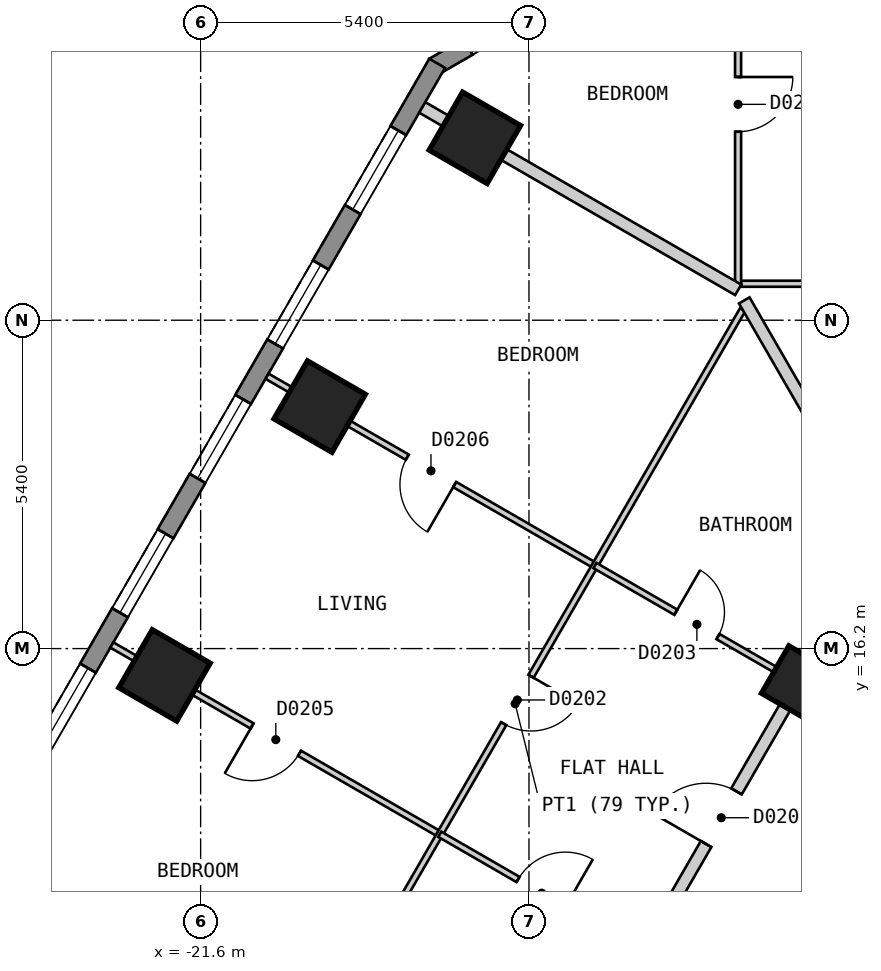
"""IFC4 building model, lengths in metres.
Left out: names, types, materials, properties, quantities, classifications, styles, units other than length and angle.
Written with IfcOpenShell. Run it as: python <this file> out.ifc"""

import sys

from ifc_helpers import new_model, si_unit, direction, frame, frame_2d, origin, origin_2d, place, context, subcontext, project, spatial, polyline, rectangle, outline, extrude, element, fill, save


model = new_model("IFC4")
c1 = context("Model", 3, precision=1e-05, world=origin(), true_north=direction((0.0, 1.0)))
c2 = subcontext(c1, "Body", "Model", "MODEL_VIEW")
j1 = project(units=[si_unit("LENGTHUNIT", "METRE"), si_unit("PLANEANGLEUNIT", "RADIAN")], contexts=[c1])
p1 = place(None, origin())
s1 = spatial("IfcSite", under=j1, at=p1, CompositionType="ELEMENT")
p2 = place(p1, origin())
s2 = spatial("IfcBuilding", under=s1, at=p2, CompositionType="ELEMENT")
p3 = place(p2, frame((0.0, 0.0, 47.4)))
s3 = spatial("IfcBuildingStorey", under=s2, at=p3, CompositionType="ELEMENT", Elevation=47.4)
for number, where, z_axis, x_axis in (
    (1, (-17.09, 24.6, 0.0), (0.0, 0.0, 1.0), (-0.5, -0.866, 0.0)),
    (2, (-19.642, 20.18, 0.0), (0.0, 0.0, 1.0), (-0.5, -0.866, 0.0)),
    (3, (-22.194, 15.759, 0.0), (0.0, 0.0, 1.0), (-0.5, -0.866, 0.0)),
):
    element("IfcColumn", number, at=place(p3, frame(where, z_axis=z_axis, x_axis=x_axis)), inside=s3, PredefinedType="COLUMN", context=c2, shape_type="SweptSolid", body=[
        extrude(rectangle(XDim=1.1, YDim=1.1, at=origin_2d()), origin(), (0.0, 0.0, 1.0), 3.0),
    ])
p4 = place(p3, frame((-11.761, 15.63, 0.0), z_axis=(0.0, 0.0, 1.0), x_axis=(-0.499984884929, -0.866034130299, 0.0)))
e4 = element("IfcColumn", 4, at=p4, inside=s3, PredefinedType="COLUMN", context=c2, shape_type="SweptSolid", body=[
    extrude(rectangle(XDim=0.9, YDim=0.9, at=origin_2d()), origin(), (0.0, 0.0, 1.0), 3.0),
])
p5 = place(p3, frame((-13.435, 28.27, 0.0), z_axis=(0.0, 0.0, 1.0), x_axis=(-0.866010750942, -0.50002537861, 0.0)))
e5 = element("IfcWall", 5, at=p5, inside=s3, PredefinedType="SOLIDWALL", context=c2, shape_type="SweptSolid", body=[
    extrude(outline(polyline([(0.0, -0.15), (5.0, -0.15), (4.919, 0.15), (0.08, 0.15), (0.0, -0.15)])), origin(), (0.0, 0.0, 1.0), 2.7),
])
p6 = place(p5, frame((0.65, 0.0, 0.15)))
e6 = element("IfcOpeningElement", 6, at=p6, cuts=e5, PredefinedType="OPENING", context=c2, shape_type="SweptSolid", body=[
    extrude(rectangle(XDim=1.2, YDim=2.1, at=frame_2d((0.6, 1.05))), frame((0.0, 0.16, 0.0), z_axis=(0.0, -1.0, 0.0), x_axis=(1.0, 0.0, 0.0)), (0.0, 0.0, 1.0), 0.32),
])
p7 = place(p5, frame((3.149, 0.0, 0.15)))
e7 = element("IfcOpeningElement", 7, at=p7, cuts=e5, PredefinedType="OPENING", context=c2, shape_type="SweptSolid", body=[
    extrude(rectangle(XDim=1.2, YDim=2.1, at=frame_2d((0.6, 1.05))), frame((0.0, 0.16, 0.0), z_axis=(0.0, -1.0, 0.0), x_axis=(1.0, 0.0, 0.0)), (0.0, 0.0, 1.0), 0.32),
])
p8 = place(p3, frame((-17.71, 25.825, 0.0), z_axis=(0.0, 0.0, 1.0), x_axis=(-0.500001938803, -0.866024284413, 0.0)))
e8 = element("IfcWall", 8, at=p8, inside=s3, PredefinedType="SOLIDWALL", context=c2, shape_type="SweptSolid", body=[
    extrude(outline(polyline([(0.0, -0.15), (27.02, -0.15), (26.94, 0.15), (0.08, 0.15), (0.0, -0.15)])), origin(), (0.0, 0.0, 1.0), 2.7),
])
p9 = place(p8, frame((1.277, 0.0, 0.15)))
e9 = element("IfcOpeningElement", 9, at=p9, cuts=e8, PredefinedType="OPENING", context=c2, shape_type="SweptSolid", body=[
    extrude(rectangle(XDim=1.5, YDim=2.1, at=frame_2d((0.75, 1.05))), frame((0.0, 0.16, 0.0), z_axis=(0.0, -1.0, 0.0), x_axis=(1.0, 0.0, 0.0)), (0.0, 0.0, 1.0), 0.32),
])
p10 = place(p8, frame((3.829, 0.0, 0.15)))
e10 = element("IfcOpeningElement", 10, at=p10, cuts=e8, PredefinedType="OPENING", context=c2, shape_type="SweptSolid", body=[
    extrude(rectangle(XDim=1.5, YDim=2.1, at=frame_2d((0.75, 1.05))), frame((0.0, 0.16, 0.0), z_axis=(0.0, -1.0, 0.0), x_axis=(1.0, 0.0, 0.0)), (0.0, 0.0, 1.0), 0.32),
])
p11 = place(p8, frame((6.382, 0.0, 0.15)))
e11 = element("IfcOpeningElement", 11, at=p11, cuts=e8, PredefinedType="OPENING", context=c2, shape_type="SweptSolid", body=[
    extrude(rectangle(XDim=1.5, YDim=2.1, at=frame_2d((0.75, 1.05))), frame((0.0, 0.16, 0.0), z_axis=(0.0, -1.0, 0.0), x_axis=(1.0, 0.0, 0.0)), (0.0, 0.0, 1.0), 0.32),
])
p12 = place(p8, frame((8.933, 0.0, 0.15)))
e12 = element("IfcOpeningElement", 12, at=p12, cuts=e8, PredefinedType="OPENING", context=c2, shape_type="SweptSolid", body=[
    extrude(rectangle(XDim=1.5, YDim=2.1, at=frame_2d((0.75, 1.05))), frame((0.0, 0.16, 0.0), z_axis=(0.0, -1.0, 0.0), x_axis=(1.0, 0.0, 0.0)), (0.0, 0.0, 1.0), 0.32),
])
p13 = place(p8, frame((11.485, 0.0, 0.15)))
e13 = element("IfcOpeningElement", 13, at=p13, cuts=e8, PredefinedType="OPENING", context=c2, shape_type="SweptSolid", body=[
    extrude(rectangle(XDim=1.5, YDim=2.1, at=frame_2d((0.75, 1.05))), frame((0.0, 0.16, 0.0), z_axis=(0.0, -1.0, 0.0), x_axis=(1.0, 0.0, 0.0)), (0.0, 0.0, 1.0), 0.32),
])
p14 = place(p8, frame((14.037, 0.0, 0.15)))
e14 = element("IfcOpeningElement", 14, at=p14, cuts=e8, PredefinedType="OPENING", context=c2, shape_type="SweptSolid", body=[
    extrude(rectangle(XDim=1.5, YDim=2.1, at=frame_2d((0.75, 1.05))), frame((0.0, 0.16, 0.0), z_axis=(0.0, -1.0, 0.0), x_axis=(1.0, 0.0, 0.0)), (0.0, 0.0, 1.0), 0.32),
])
p15 = place(p8, frame((16.589, 0.0, 0.15)))
e15 = element("IfcOpeningElement", 15, at=p15, cuts=e8, PredefinedType="OPENING", context=c2, shape_type="SweptSolid", body=[
    extrude(rectangle(XDim=1.5, YDim=2.1, at=frame_2d((0.75, 1.05))), frame((0.0, 0.16, 0.0), z_axis=(0.0, -1.0, 0.0), x_axis=(1.0, 0.0, 0.0)), (0.0, 0.0, 1.0), 0.32),
])
p16 = place(p8, frame((19.141, 0.0, 0.15)))
e16 = element("IfcOpeningElement", 16, at=p16, cuts=e8, PredefinedType="OPENING", context=c2, shape_type="SweptSolid", body=[
    extrude(rectangle(XDim=1.5, YDim=2.1, at=frame_2d((0.75, 1.05))), frame((0.0, 0.16, 0.0), z_axis=(0.0, -1.0, 0.0), x_axis=(1.0, 0.0, 0.0)), (0.0, 0.0, 1.0), 0.32),
])
p17 = place(p8, frame((21.693, 0.0, 0.15)))
e17 = element("IfcOpeningElement", 17, at=p17, cuts=e8, PredefinedType="OPENING", context=c2, shape_type="SweptSolid", body=[
    extrude(rectangle(XDim=1.5, YDim=2.1, at=frame_2d((0.75, 1.05))), frame((0.0, 0.16, 0.0), z_axis=(0.0, -1.0, 0.0), x_axis=(1.0, 0.0, 0.0)), (0.0, 0.0, 1.0), 0.32),
])
p18 = place(p8, frame((24.244, 0.0, 0.15)))
e18 = element("IfcOpeningElement", 18, at=p18, cuts=e8, PredefinedType="OPENING", context=c2, shape_type="SweptSolid", body=[
    extrude(rectangle(XDim=1.5, YDim=2.1, at=frame_2d((0.75, 1.05))), frame((0.0, 0.16, 0.0), z_axis=(0.0, -1.0, 0.0), x_axis=(1.0, 0.0, 0.0)), (0.0, 0.0, 1.0), 0.32),
])
p19 = place(p3, frame((-18.244, -0.001, 0.0), z_axis=(0.0, 0.0, 1.0), x_axis=(0.499962999376, 0.866046765051, 0.0)))
e19 = element("IfcWall", 19, at=p19, inside=s3, PredefinedType="PARTITIONING", context=c2, shape_type="SweptSolid", body=[
    extrude(rectangle(XDim=18.245, YDim=0.2, at=frame_2d((9.123, 0.0))), origin(), (0.0, 0.0, 1.0), 2.7),
])
p20 = place(p19, frame((8.672, 0.0, 0.0)))
e20 = element("IfcOpeningElement", 20, at=p20, cuts=e19, PredefinedType="OPENING", context=c2, shape_type="SweptSolid", body=[
    extrude(rectangle(XDim=0.9, YDim=2.1, at=frame_2d((0.45, 1.05))), frame((0.0, 0.11, 0.0), z_axis=(0.0, -1.0, 0.0), x_axis=(1.0, 0.0, 0.0)), (0.0, 0.0, 1.0), 0.22),
])
p21 = place(p3, frame((-20.727, 0.099, 0.0), z_axis=(0.0, 0.0, 1.0), x_axis=(0.499993204491, 0.866029327138, 0.0)))
e21 = element("IfcWall", 21, at=p21, inside=s3, PredefinedType="PARTITIONING", context=c2, shape_type="SweptSolid", body=[
    extrude(rectangle(XDim=20.554, YDim=0.2, at=frame_2d((10.277, 0.0))), origin(), (0.0, 0.0, 1.0), 2.7),
])
p22 = place(p21, frame((14.88, 0.0, 0.0)))
e22 = element("IfcOpeningElement", 22, at=p22, cuts=e21, PredefinedType="OPENING", context=c2, shape_type="SweptSolid", body=[
    extrude(rectangle(XDim=1.0, YDim=2.1, at=frame_2d((0.5, 1.05))), frame((0.0, 0.11, 0.0), z_axis=(0.0, -1.0, 0.0), x_axis=(1.0, 0.0, 0.0)), (0.0, 0.0, 1.0), 0.22),
])
p23 = place(p21, frame((4.673, 0.0, 0.0)))
e23 = element("IfcOpeningElement", 23, at=p23, cuts=e21, PredefinedType="OPENING", context=c2, shape_type="SweptSolid", body=[
    extrude(rectangle(XDim=1.0, YDim=2.1, at=frame_2d((0.5, 1.05))), frame((0.0, 0.11, 0.0), z_axis=(0.0, -1.0, 0.0), x_axis=(1.0, 0.0, 0.0)), (0.0, 0.0, 1.0), 0.22),
])
p24 = place(p21, frame((0.838, 0.0, 0.0)))
e24 = element("IfcOpeningElement", 24, at=p24, cuts=e21, PredefinedType="OPENING", context=c2, shape_type="SweptSolid", body=[
    extrude(rectangle(XDim=0.8, YDim=2.1, at=frame_2d((0.4, 1.05))), frame((0.0, 0.11, 0.0), z_axis=(0.0, -1.0, 0.0), x_axis=(1.0, 0.0, 0.0)), (0.0, 0.0, 1.0), 0.22),
])
p25 = place(p3, frame((-20.508, 20.679, 0.0), z_axis=(0.0, 0.0, 1.0), x_axis=(0.86607068519, -0.499921562103, 0.0)))
e25 = element("IfcWall", 25, at=p25, inside=s3, PredefinedType="PARTITIONING", context=c2, shape_type="SweptSolid", body=[
    extrude(rectangle(XDim=6.227, YDim=0.1, at=frame_2d((3.114, 0.0))), origin(), (0.0, 0.0, 1.0), 2.7),
])
p26 = place(p25, frame((2.663, 0.0, 0.0)))
e26 = element("IfcOpeningElement", 26, at=p26, cuts=e25, PredefinedType="OPENING", context=c2, shape_type="SweptSolid", body=[
    extrude(rectangle(XDim=0.9, YDim=2.1, at=frame_2d((0.45, 1.05))), frame((0.0, 0.06, 0.0), z_axis=(0.0, -1.0, 0.0), x_axis=(1.0, 0.0, 0.0)), (0.0, 0.0, 1.0), 0.12),
])
p27 = place(p3, frame((-23.06, 16.259, 0.0), z_axis=(0.0, 0.0, 1.0), x_axis=(0.86607068519, -0.499921562103, 0.0)))
e27 = element("IfcWall", 27, at=p27, inside=s3, PredefinedType="PARTITIONING", context=c2, shape_type="SweptSolid", body=[
    extrude(rectangle(XDim=6.227, YDim=0.1, at=frame_2d((3.114, 0.0))), origin(), (0.0, 0.0, 1.0), 2.7),
])
p28 = place(p27, frame((2.663, 0.0, 0.0)))
e28 = element("IfcOpeningElement", 28, at=p28, cuts=e27, PredefinedType="OPENING", context=c2, shape_type="SweptSolid", body=[
    extrude(rectangle(XDim=0.9, YDim=2.1, at=frame_2d((0.45, 1.05))), frame((0.0, 0.06, 0.0), z_axis=(0.0, -1.0, 0.0), x_axis=(1.0, 0.0, 0.0)), (0.0, 0.0, 1.0), 0.12),
])
p29 = place(p3, frame((-12.711, 22.2, 0.0), z_axis=(0.0, 0.0, 1.0), x_axis=(1.0, 0.0, 0.0)))
e29 = element("IfcWall", 29, at=p29, inside=s3, PredefinedType="PARTITIONING", context=c2, shape_type="SweptSolid", body=[
    extrude(rectangle(XDim=10.058, YDim=0.1, at=frame_2d((5.029, 0.0))), origin(), (0.0, 0.0, 1.0), 2.7),
])
p30 = place(p29, frame((7.156, 0.0, 0.0)))
e30 = element("IfcOpeningElement", 30, at=p30, cuts=e29, PredefinedType="OPENING", context=c2, shape_type="SweptSolid", body=[
    extrude(rectangle(XDim=0.9, YDim=2.1, at=frame_2d((0.45, 1.05))), frame((0.0, 0.06, 0.0), z_axis=(0.0, -1.0, 0.0), x_axis=(1.0, 0.0, 0.0)), (0.0, 0.0, 1.0), 0.12),
])
p31 = place(p29, frame((2.102, 0.0, 0.0)))
e31 = element("IfcOpeningElement", 31, at=p31, cuts=e29, PredefinedType="OPENING", context=c2, shape_type="SweptSolid", body=[
    extrude(rectangle(XDim=0.8, YDim=2.1, at=frame_2d((0.4, 1.05))), frame((0.0, 0.06, 0.0), z_axis=(0.0, -1.0, 0.0), x_axis=(1.0, 0.0, 0.0)), (0.0, 0.0, 1.0), 0.12),
])
p32 = place(p3, frame((-20.169, 8.812, 0.0), z_axis=(0.0, 0.0, 1.0), x_axis=(0.499995459772, 0.86602802507, 0.0)))
e32 = element("IfcWall", 32, at=p32, inside=s3, PredefinedType="PARTITIONING", context=c2, shape_type="SweptSolid", body=[
    extrude(rectangle(XDim=14.966, YDim=0.1, at=frame_2d((7.483, 0.0))), origin(), (0.0, 0.0, 1.0), 2.7),
])
p33 = place(p32, frame((7.105, 0.0, 0.0)))
e33 = element("IfcOpeningElement", 33, at=p33, cuts=e32, PredefinedType="OPENING", context=c2, shape_type="SweptSolid", body=[
    extrude(rectangle(XDim=0.9, YDim=2.1, at=frame_2d((0.45, 1.05))), frame((0.0, 0.06, 0.0), z_axis=(0.0, -1.0, 0.0), x_axis=(1.0, 0.0, 0.0)), (0.0, 0.0, 1.0), 0.12),
])
p34 = place(p3, frame((-12.761, 22.2, 0.0), z_axis=(0.0, 0.0, 1.0), x_axis=(0.0, 1.0, 0.0)))
e34 = element("IfcWall", 34, at=p34, inside=s3, PredefinedType="PARTITIONING", context=c2, shape_type="SweptSolid", body=[
    extrude(rectangle(XDim=5.9, YDim=0.1, at=frame_2d((2.95, 0.0))), origin(), (0.0, 0.0, 1.0), 2.7),
])
p35 = place(p34, frame((2.5, 0.0, 0.0)))
e35 = element("IfcOpeningElement", 35, at=p35, cuts=e34, PredefinedType="OPENING", context=c2, shape_type="SweptSolid", body=[
    extrude(rectangle(XDim=0.9, YDim=2.1, at=frame_2d((0.45, 1.05))), frame((0.0, 0.06, 0.0), z_axis=(0.0, -1.0, 0.0), x_axis=(1.0, 0.0, 0.0)), (0.0, 0.0, 1.0), 0.12),
])
p36 = place(p3, frame((-12.659, 21.926, 0.0), z_axis=(0.0, 0.0, 1.0), x_axis=(0.500025458316, -0.86601070492, 0.0)))
e36 = element("IfcWall", 36, at=p36, inside=s3, PredefinedType="PARTITIONING", context=c2, shape_type="SweptSolid", body=[
    extrude(rectangle(XDim=4.533, YDim=0.2, at=frame_2d((2.267, 0.0))), origin(), (0.0, 0.0, 1.0), 2.7),
])
p37 = place(p3, frame((-17.955, 25.099, 0.0), z_axis=(0.0, 0.0, 1.0), x_axis=(0.86609140076, -0.499885672459, 0.0)))
e37 = element("IfcWall", 37, at=p37, inside=s3, PredefinedType="PARTITIONING", context=c2, shape_type="SweptSolid", body=[
    extrude(rectangle(XDim=6.0, YDim=0.2, at=frame_2d((3.0, 0.0))), origin(), (0.0, 0.0, 1.0), 2.7),
])
p38 = place(p3, frame((-15.115, 17.566, 0.0), z_axis=(0.0, 0.0, 1.0), x_axis=(0.866008894869, -0.50002859319, 0.0)))
e38 = element("IfcWall", 38, at=p38, inside=s3, PredefinedType="PARTITIONING", context=c2, shape_type="SweptSolid", body=[
    extrude(rectangle(XDim=3.774, YDim=0.1, at=frame_2d((1.887, 0.0))), origin(), (0.0, 0.0, 1.0), 2.7),
])
p39 = place(p38, frame((1.536, 0.0, 0.0)))
e39 = element("IfcOpeningElement", 39, at=p39, cuts=e38, PredefinedType="OPENING", context=c2, shape_type="SweptSolid", body=[
    extrude(rectangle(XDim=0.8, YDim=2.1, at=frame_2d((0.4, 1.05))), frame((0.0, 0.06, 0.0), z_axis=(0.0, -1.0, 0.0), x_axis=(1.0, 0.0, 0.0)), (0.0, 0.0, 1.0), 0.12),
])
p40 = place(p3, frame((-17.667, 13.146, 0.0), z_axis=(0.0, 0.0, 1.0), x_axis=(0.866008894869, -0.50002859319, 0.0)))
e40 = element("IfcWall", 40, at=p40, inside=s3, PredefinedType="PARTITIONING", context=c2, shape_type="SweptSolid", body=[
    extrude(rectangle(XDim=3.774, YDim=0.1, at=frame_2d((1.887, 0.0))), origin(), (0.0, 0.0, 1.0), 2.7),
])
p41 = place(p40, frame((1.486, 0.0, 0.0)))
e41 = element("IfcOpeningElement", 41, at=p41, cuts=e40, PredefinedType="OPENING", context=c2, shape_type="SweptSolid", body=[
    extrude(rectangle(XDim=0.9, YDim=2.1, at=frame_2d((0.45, 1.05))), frame((0.0, 0.06, 0.0), z_axis=(0.0, -1.0, 0.0), x_axis=(1.0, 0.0, 0.0)), (0.0, 0.0, 1.0), 0.12),
])
p42 = place(p9, origin())
e42 = element("IfcWindow", 42, at=p42, inside=s3, PartitioningType="SINGLE_PANEL", PredefinedType="WINDOW", context=c2, shape_type="SweptSolid", body=[
    extrude(rectangle(XDim=1.5, YDim=2.1, at=frame_2d((0.75, 1.05))), frame((0.0, 0.03, 0.0), z_axis=(0.0, -1.0, 0.0), x_axis=(1.0, 0.0, 0.0)), (0.0, 0.0, 1.0), 0.06),
])
fill(e9, e42)
p43 = place(p10, origin())
e43 = element("IfcWindow", 43, at=p43, inside=s3, PartitioningType="SINGLE_PANEL", PredefinedType="WINDOW", context=c2, shape_type="SweptSolid", body=[
    extrude(rectangle(XDim=1.5, YDim=2.1, at=frame_2d((0.75, 1.05))), frame((0.0, 0.03, 0.0), z_axis=(0.0, -1.0, 0.0), x_axis=(1.0, 0.0, 0.0)), (0.0, 0.0, 1.0), 0.06),
])
fill(e10, e43)
p44 = place(p11, origin())
e44 = element("IfcWindow", 44, at=p44, inside=s3, PartitioningType="SINGLE_PANEL", PredefinedType="WINDOW", context=c2, shape_type="SweptSolid", body=[
    extrude(rectangle(XDim=1.5, YDim=2.1, at=frame_2d((0.75, 1.05))), frame((0.0, 0.03, 0.0), z_axis=(0.0, -1.0, 0.0), x_axis=(1.0, 0.0, 0.0)), (0.0, 0.0, 1.0), 0.06),
])
fill(e11, e44)
p45 = place(p12, origin())
e45 = element("IfcWindow", 45, at=p45, inside=s3, PartitioningType="SINGLE_PANEL", PredefinedType="WINDOW", context=c2, shape_type="SweptSolid", body=[
    extrude(rectangle(XDim=1.5, YDim=2.1, at=frame_2d((0.75, 1.05))), frame((0.0, 0.03, 0.0), z_axis=(0.0, -1.0, 0.0), x_axis=(1.0, 0.0, 0.0)), (0.0, 0.0, 1.0), 0.06),
])
fill(e12, e45)
p46 = place(p13, origin())
e46 = element("IfcWindow", 46, at=p46, inside=s3, PartitioningType="SINGLE_PANEL", PredefinedType="WINDOW", context=c2, shape_type="SweptSolid", body=[
    extrude(rectangle(XDim=1.5, YDim=2.1, at=frame_2d((0.75, 1.05))), frame((0.0, 0.03, 0.0), z_axis=(0.0, -1.0, 0.0), x_axis=(1.0, 0.0, 0.0)), (0.0, 0.0, 1.0), 0.06),
])
fill(e13, e46)
p47 = place(p22, origin())
e47 = element("IfcDoor", 47, at=p47, inside=s3, OperationType="SINGLE_SWING_LEFT", PredefinedType="DOOR", context=c2, shape_type="SweptSolid", body=[
    extrude(rectangle(XDim=1.0, YDim=2.1, at=frame_2d((0.5, 1.05))), frame((0.0, 0.025, 0.0), z_axis=(0.0, -1.0, 0.0), x_axis=(1.0, 0.0, 0.0)), (0.0, 0.0, 1.0), 0.05),
])
fill(e22, e47)
p48 = place(p33, origin())
e48 = element("IfcDoor", 48, at=p48, inside=s3, OperationType="SINGLE_SWING_RIGHT", PredefinedType="DOOR", context=c2, shape_type="SweptSolid", body=[
    extrude(rectangle(XDim=0.9, YDim=2.1, at=frame_2d((0.45, 1.05))), frame((0.0, 0.025, 0.0), z_axis=(0.0, -1.0, 0.0), x_axis=(1.0, 0.0, 0.0)), (0.0, 0.0, 1.0), 0.05),
])
fill(e33, e48)
p49 = place(p39, origin())
e49 = element("IfcDoor", 49, at=p49, inside=s3, OperationType="SINGLE_SWING_LEFT", PredefinedType="DOOR", context=c2, shape_type="SweptSolid", body=[
    extrude(rectangle(XDim=0.8, YDim=2.1, at=frame_2d((0.4, 1.05))), frame((0.0, 0.025, 0.0), z_axis=(0.0, -1.0, 0.0), x_axis=(1.0, 0.0, 0.0)), (0.0, 0.0, 1.0), 0.05),
])
fill(e39, e49)
p50 = place(p41, origin())
e50 = element("IfcDoor", 50, at=p50, inside=s3, OperationType="SINGLE_SWING_RIGHT", PredefinedType="DOOR", context=c2, shape_type="SweptSolid", body=[
    extrude(rectangle(XDim=0.9, YDim=2.1, at=frame_2d((0.45, 1.05))), frame((0.0, 0.025, 0.0), z_axis=(0.0, -1.0, 0.0), x_axis=(1.0, 0.0, 0.0)), (0.0, 0.0, 1.0), 0.05),
])
fill(e41, e50)
p51 = place(p28, origin())
e51 = element("IfcDoor", 51, at=p51, inside=s3, OperationType="SINGLE_SWING_LEFT", PredefinedType="DOOR", context=c2, shape_type="SweptSolid", body=[
    extrude(rectangle(XDim=0.9, YDim=2.1, at=frame_2d((0.45, 1.05))), frame((0.0, 0.025, 0.0), z_axis=(0.0, -1.0, 0.0), x_axis=(1.0, 0.0, 0.0)), (0.0, 0.0, 1.0), 0.05),
])
fill(e28, e51)
p52 = place(p26, origin())
e52 = element("IfcDoor", 52, at=p52, inside=s3, OperationType="SINGLE_SWING_RIGHT", PredefinedType="DOOR", context=c2, shape_type="SweptSolid", body=[
    extrude(rectangle(XDim=0.9, YDim=2.1, at=frame_2d((0.45, 1.05))), frame((0.0, 0.025, 0.0), z_axis=(0.0, -1.0, 0.0), x_axis=(1.0, 0.0, 0.0)), (0.0, 0.0, 1.0), 0.05),
])
fill(e26, e52)
p53 = place(p35, origin())
e53 = element("IfcDoor", 53, at=p53, inside=s3, OperationType="SINGLE_SWING_RIGHT", PredefinedType="DOOR", context=c2, shape_type="SweptSolid", body=[
    extrude(rectangle(XDim=0.9, YDim=2.1, at=frame_2d((0.45, 1.05))), frame((0.0, 0.025, 0.0), z_axis=(0.0, -1.0, 0.0), x_axis=(1.0, 0.0, 0.0)), (0.0, 0.0, 1.0), 0.05),
])
fill(e35, e53)
save(model, sys.argv[1])
